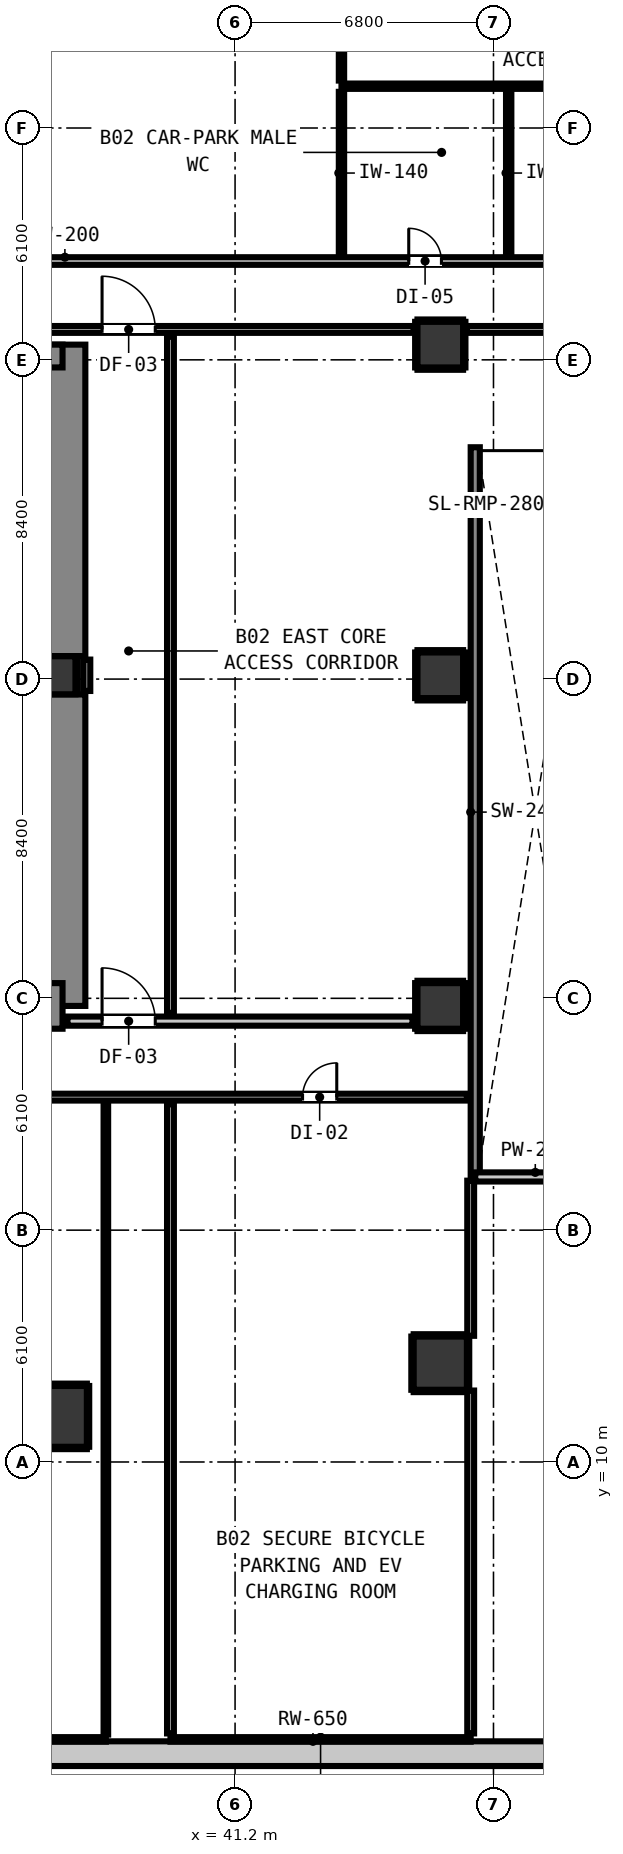
"""IFC4 building model, lengths in metres.
Left out: names, types, materials, properties, quantities, classifications, styles, units other than length and angle.
Written with IfcOpenShell. Run it as: python <this file> out.ifc"""

import sys

from ifc_helpers import new_model, si_unit, direction, frame, frame_2d, origin, origin_2d, place, context, subcontext, project, spatial, rectangle, circle, extrude, element, fill, save


model = new_model("IFC4")
c1 = context("Model", 3, precision=1e-05, world=origin(), true_north=direction((0.0, 1.0)))
c2 = subcontext(c1, "Body", "Model", "MODEL_VIEW")
j1 = project(units=[si_unit("LENGTHUNIT", "METRE"), si_unit("PLANEANGLEUNIT", "RADIAN")], contexts=[c1])
p1 = place(None, origin())
s1 = spatial("IfcSite", under=j1, at=p1, CompositionType="ELEMENT")
p2 = place(p1, origin())
s2 = spatial("IfcBuilding", under=s1, at=p2, CompositionType="ELEMENT")
p3 = place(p2, frame((0.0, 0.0, -8.8)))
s3 = spatial("IfcBuildingStorey", under=s2, at=p3, CompositionType="ELEMENT", Elevation=-8.8)
p4 = place(p3, frame((1.5, 2.325, 0.0), z_axis=(0.0, 0.0, 1.0), x_axis=(1.0, 0.0, 0.0)))
e1 = element("IfcWall", 1, at=p4, inside=s3, PredefinedType="SOLIDWALL", context=c2, shape_type="SweptSolid", body=[
    extrude(rectangle(XDim=83.5, YDim=0.65, at=frame_2d((41.75, 0.0))), origin(), (0.0, 0.0, 1.0), 4.4),
])
p5 = place(p3, frame((36.5, 30.7, 0.0), z_axis=(0.0, 0.0, 1.0), x_axis=(1.0, 0.0, 0.0)))
e2 = element("IfcColumn", 2, at=p5, inside=s3, PredefinedType="COLUMN", context=c2, shape_type="SweptSolid", body=[
    extrude(rectangle(XDim=1.0, YDim=1.0, at=origin_2d()), origin(), (0.0, 0.0, 1.0), 4.4),
])
p6 = place(p3, frame((36.66, 22.0, 0.0), z_axis=(0.0, 0.0, 1.0), x_axis=(0.0, 1.0, 0.0)))
e3 = element("IfcWall", 3, at=p6, inside=s3, PredefinedType="SHEAR", context=c2, shape_type="SweptSolid", body=[
    extrude(rectangle(XDim=8.195, YDim=1.2, at=frame_2d((4.098, 0.0))), origin(), (0.0, 0.0, 1.0), 4.4),
])
p7 = place(p3, frame((36.66, 31.205, 0.0), z_axis=(0.0, 0.0, 1.0), x_axis=(0.0, 1.0, 0.0)))
e4 = element("IfcWall", 4, at=p7, inside=s3, PredefinedType="SHEAR", context=c2, shape_type="SweptSolid", body=[
    extrude(rectangle(XDim=8.195, YDim=1.2, at=frame_2d((4.097, 0.0))), origin(), (0.0, 0.0, 1.0), 4.4),
])
p8 = place(p3, frame((29.705, 22.0, 0.0), z_axis=(0.0, 0.0, 1.0), x_axis=(1.0, 0.0, 0.0)))
e5 = element("IfcWall", 5, at=p8, inside=s3, PredefinedType="SHEAR", context=c2, shape_type="SweptSolid", body=[
    extrude(rectangle(XDim=6.955, YDim=1.2, at=frame_2d((3.478, 0.0))), origin(), (0.0, 0.0, 1.0), 4.4),
])
p9 = place(p3, frame((32.58, 39.1, 0.0), z_axis=(0.0, 0.0, 1.0), x_axis=(1.0, 0.0, 0.0)))
e6 = element("IfcWall", 6, at=p9, inside=s3, PredefinedType="SHEAR", context=c2, shape_type="SweptSolid", body=[
    extrude(rectangle(XDim=4.08, YDim=0.6, at=frame_2d((2.04, 0.0))), origin(), (0.0, 0.0, 1.0), 4.4),
])
p10 = place(p3, frame((47.52, 17.5, 0.0), z_axis=(0.0, 0.0, 1.0), x_axis=(0.0, 1.0, 0.0)))
e7 = element("IfcWall", 7, at=p10, inside=s3, PredefinedType="SHEAR", context=c2, shape_type="SweptSolid", body=[
    extrude(rectangle(XDim=19.2, YDim=0.24, at=frame_2d((9.6, 0.0))), origin(), (0.0, 0.0, 1.0), 4.4),
])
p11 = place(p3, frame((36.5, 11.2, 0.0), z_axis=(0.0, 0.0, 1.0), x_axis=(1.0, 0.0, 0.0)))
e8 = element("IfcColumn", 8, at=p11, inside=s3, PredefinedType="COLUMN", context=c2, shape_type="SweptSolid", body=[
    extrude(rectangle(XDim=1.6, YDim=1.6, at=origin_2d()), origin(), (0.0, 0.0, 1.0), 4.4),
])
for number, where, z_axis, x_axis in (
    (9, (46.6, 22.0, 0.0), (0.0, 0.0, 1.0), (1.0, 0.0, 0.0)),
    (10, (46.6, 30.7, 0.0), (0.0, 0.0, 1.0), (1.0, 0.0, 0.0)),
    (11, (46.6, 39.4, 0.0), (0.0, 0.0, 1.0), (1.0, 0.0, 0.0)),
):
    element("IfcColumn", number, at=place(p3, frame(where, z_axis=z_axis, x_axis=x_axis)), inside=s3, PredefinedType="COLUMN", context=c2, shape_type="SweptSolid", body=[
        extrude(circle(Radius=0.6, at=origin_2d()), origin(), (0.0, 0.0, 1.0), 4.4),
    ])
p12 = place(p3, frame((46.6, 12.6, 0.0), z_axis=(0.0, 0.0, 1.0), x_axis=(1.0, 0.0, 0.0)))
e12 = element("IfcColumn", 12, at=p12, inside=s3, PredefinedType="COLUMN", context=c2, shape_type="SweptSolid", body=[
    extrude(rectangle(XDim=1.4, YDim=1.4, at=origin_2d()), origin(), (0.0, 0.0, 1.0), 4.4),
])
p13 = place(p3, frame((47.52, 17.5, 0.0), z_axis=(0.0, 0.0, 1.0), x_axis=(1.0, 0.0, 0.0)))
e13 = element("IfcWall", 13, at=p13, inside=s3, PredefinedType="PARAPET", context=c2, shape_type="SweptSolid", body=[
    extrude(rectangle(XDim=3.16, YDim=0.24, at=frame_2d((1.58, 0.0))), origin(), (0.0, 0.0, 1.0), 1.2),
])
p14 = place(p3, frame((36.79, 21.6, 0.0), z_axis=(0.0, 0.0, 1.0), x_axis=(1.0, 0.0, 0.0)))
e14 = element("IfcWall", 14, at=p14, inside=s3, PredefinedType="PARTITIONING", context=c2, shape_type="SweptSolid", body=[
    extrude(rectangle(XDim=9.078, YDim=0.24, at=frame_2d((4.539, 0.0))), origin(), (0.0, 0.0, 1.0), 3.335),
])
p15 = place(p14, frame((0.91, 0.0, 0.0)))
e15 = element("IfcOpeningElement", 15, at=p15, cuts=e14, PredefinedType="OPENING", context=c2, shape_type="SweptSolid", body=[
    extrude(rectangle(XDim=1.4, YDim=2.15, at=frame_2d((0.7, 1.075))), frame((0.0, 0.13, 0.0), z_axis=(0.0, -1.0, 0.0), x_axis=(1.0, 0.0, 0.0)), (0.0, 0.0, 1.0), 0.26),
])
p16 = place(p3, frame((10.4, 41.6, 0.0), z_axis=(0.0, 0.0, 1.0), x_axis=(1.0, 0.0, 0.0)))
e16 = element("IfcWall", 16, at=p16, inside=s3, PredefinedType="PARTITIONING", context=c2, shape_type="SweptSolid", body=[
    extrude(rectangle(XDim=44.788, YDim=0.2, at=frame_2d((22.394, 0.0))), origin(), (0.0, 0.0, 1.0), 4.1),
])
p17 = place(p16, frame((16.374, 0.0, 0.0)))
e17 = element("IfcOpeningElement", 17, at=p17, cuts=e16, PredefinedType="OPENING", context=c2, shape_type="SweptSolid", body=[
    extrude(rectangle(XDim=0.9, YDim=2.1, at=frame_2d((0.45, 1.05))), frame((0.0, 0.11, 0.0), z_axis=(0.0, -1.0, 0.0), x_axis=(1.0, 0.0, 0.0)), (0.0, 0.0, 1.0), 0.22),
])
p18 = place(p16, frame((35.37, 0.0, 0.0)))
e18 = element("IfcOpeningElement", 18, at=p18, cuts=e16, PredefinedType="OPENING", context=c2, shape_type="SweptSolid", body=[
    extrude(rectangle(XDim=0.86, YDim=2.02, at=frame_2d((0.43, 1.01))), frame((0.0, 0.11, 0.0), z_axis=(0.0, -1.0, 0.0), x_axis=(1.0, 0.0, 0.0)), (0.0, 0.0, 1.0), 0.22),
])
p19 = place(p16, frame((39.725, 0.0, 0.0)))
e19 = element("IfcOpeningElement", 19, at=p19, cuts=e16, PredefinedType="OPENING", context=c2, shape_type="SweptSolid", body=[
    extrude(rectangle(XDim=0.95, YDim=2.1, at=frame_2d((0.475, 1.05))), frame((0.0, 0.11, 0.0), z_axis=(0.0, -1.0, 0.0), x_axis=(1.0, 0.0, 0.0)), (0.0, 0.0, 1.0), 0.22),
])
p20 = place(p3, frame((10.4, 19.6, 0.0), z_axis=(0.0, 0.0, 1.0), x_axis=(1.0, 0.0, 0.0)))
e20 = element("IfcWall", 20, at=p20, inside=s3, PredefinedType="PARTITIONING", context=c2, shape_type="SweptSolid", body=[
    extrude(rectangle(XDim=36.902, YDim=0.18, at=frame_2d((18.451, 0.0))), origin(), (0.0, 0.0, 1.0), 4.1),
])
p21 = place(p20, frame((13.274, 0.0, 0.0)))
e21 = element("IfcOpeningElement", 21, at=p21, cuts=e20, PredefinedType="OPENING", context=c2, shape_type="SweptSolid", body=[
    extrude(rectangle(XDim=0.9, YDim=2.1, at=frame_2d((0.45, 1.05))), frame((0.0, 0.1, 0.0), z_axis=(0.0, -1.0, 0.0), x_axis=(1.0, 0.0, 0.0)), (0.0, 0.0, 1.0), 0.2),
])
p22 = place(p20, frame((32.576, 0.0, 0.0)))
e22 = element("IfcOpeningElement", 22, at=p22, cuts=e20, PredefinedType="OPENING", context=c2, shape_type="SweptSolid", body=[
    extrude(rectangle(XDim=0.9, YDim=2.1, at=frame_2d((0.45, 1.05))), frame((0.0, 0.1, 0.0), z_axis=(0.0, -1.0, 0.0), x_axis=(1.0, 0.0, 0.0)), (0.0, 0.0, 1.0), 0.2),
])
p23 = place(p3, frame((29.802, 39.8, 0.0), z_axis=(0.0, 0.0, 1.0), x_axis=(1.0, 0.0, 0.0)))
e23 = element("IfcWall", 23, at=p23, inside=s3, PredefinedType="PARTITIONING", context=c2, shape_type="SweptSolid", body=[
    extrude(rectangle(XDim=16.096, YDim=0.18, at=frame_2d((8.048, 0.0))), origin(), (0.0, 0.0, 1.0), 3.335),
])
p24 = place(p23, frame((7.898, 0.0, 0.0)))
e24 = element("IfcOpeningElement", 24, at=p24, cuts=e23, PredefinedType="OPENING", context=c2, shape_type="SweptSolid", body=[
    extrude(rectangle(XDim=1.4, YDim=2.15, at=frame_2d((0.7, 1.075))), frame((0.0, 0.1, 0.0), z_axis=(0.0, -1.0, 0.0), x_axis=(1.0, 0.0, 0.0)), (0.0, 0.0, 1.0), 0.2),
])
p25 = place(p3, frame((47.302, 39.8, 0.0), z_axis=(0.0, 0.0, 1.0), x_axis=(1.0, 0.0, 0.0)))
e25 = element("IfcWall", 25, at=p25, inside=s3, PredefinedType="PARTITIONING", context=c2, shape_type="SweptSolid", body=[
    extrude(rectangle(XDim=23.098, YDim=0.18, at=frame_2d((11.549, 0.0))), origin(), (0.0, 0.0, 1.0), 4.1),
])
p26 = place(p3, frame((44.0, 46.2, 0.0), z_axis=(0.0, 0.0, 1.0), x_axis=(1.0, 0.0, 0.0)))
e26 = element("IfcWall", 26, at=p26, inside=s3, PredefinedType="PARTITIONING", context=c2, shape_type="SweptSolid", body=[
    extrude(rectangle(XDim=8.8, YDim=0.14, at=frame_2d((4.4, 0.0))), origin(), (0.0, 0.0, 1.0), 4.1),
])
p27 = place(p3, frame((2.2, 2.7, 0.0), z_axis=(0.0, 0.0, 1.0), x_axis=(1.0, 0.0, 0.0)))
e27 = element("IfcWall", 27, at=p27, inside=s3, PredefinedType="PARTITIONING", context=c2, shape_type="SweptSolid", body=[
    extrude(rectangle(XDim=35.6, YDim=0.12, at=frame_2d((17.8, 0.0))), origin(), (0.0, 0.0, 1.0), 4.1),
])
p28 = place(p3, frame((39.5, 2.7, 0.0), z_axis=(0.0, 0.0, 1.0), x_axis=(1.0, 0.0, 0.0)))
e28 = element("IfcWall", 28, at=p28, inside=s3, PredefinedType="PARTITIONING", context=c2, shape_type="SweptSolid", body=[
    extrude(rectangle(XDim=7.9, YDim=0.12, at=frame_2d((3.95, 0.0))), origin(), (0.0, 0.0, 1.0), 4.1),
])
p29 = place(p3, frame((37.3, 30.287, 0.0), z_axis=(0.0, 0.0, 1.0), x_axis=(0.0, 1.0, 0.0)))
e29 = element("IfcWall", 29, at=p29, inside=s3, PredefinedType="PARTITIONING", context=c2, shape_type="SweptSolid", body=[
    extrude(rectangle(XDim=0.826, YDim=0.18, at=frame_2d((0.413, 0.0))), origin(), (0.0, 0.0, 1.0), 4.1),
])
p30 = place(p3, frame((39.5, 2.858, 0.0), z_axis=(0.0, 0.0, 1.0), x_axis=(0.0, 1.0, 0.0)))
e30 = element("IfcWall", 30, at=p30, inside=s3, PredefinedType="PARTITIONING", context=c2, shape_type="SweptSolid", body=[
    extrude(rectangle(XDim=16.554, YDim=0.18, at=frame_2d((8.277, 0.0))), origin(), (0.0, 0.0, 1.0), 4.1),
])
p31 = place(p3, frame((39.5, 21.818, 0.0), z_axis=(0.0, 0.0, 1.0), x_axis=(0.0, 1.0, 0.0)))
e31 = element("IfcWall", 31, at=p31, inside=s3, PredefinedType="PARTITIONING", context=c2, shape_type="SweptSolid", body=[
    extrude(rectangle(XDim=17.794, YDim=0.18, at=frame_2d((8.897, 0.0))), origin(), (0.0, 0.0, 1.0), 4.1),
])
p32 = place(p3, frame((47.4, 2.858, 0.0), z_axis=(0.0, 0.0, 1.0), x_axis=(0.0, 1.0, 0.0)))
e32 = element("IfcWall", 32, at=p32, inside=s3, PredefinedType="PARTITIONING", context=c2, shape_type="SweptSolid", body=[
    extrude(rectangle(XDim=9.022, YDim=0.18, at=frame_2d((4.511, 0.0))), origin(), (0.0, 0.0, 1.0), 4.1),
])
p33 = place(p3, frame((47.4, 13.32, 0.0), z_axis=(0.0, 0.0, 1.0), x_axis=(0.0, 1.0, 0.0)))
e33 = element("IfcWall", 33, at=p33, inside=s3, PredefinedType="PARTITIONING", context=c2, shape_type="SweptSolid", body=[
    extrude(rectangle(XDim=4.082, YDim=0.18, at=frame_2d((2.041, 0.0))), origin(), (0.0, 0.0, 1.0), 4.1),
])
p34 = place(p3, frame((44.0, 41.778, 0.0), z_axis=(0.0, 0.0, 1.0), x_axis=(0.0, 1.0, 0.0)))
e34 = element("IfcWall", 34, at=p34, inside=s3, PredefinedType="PARTITIONING", context=c2, shape_type="SweptSolid", body=[
    extrude(rectangle(XDim=4.274, YDim=0.14, at=frame_2d((2.137, 0.0))), origin(), (0.0, 0.0, 1.0), 4.1),
])
p35 = place(p3, frame((44.0, 46.348, 0.0), z_axis=(0.0, 0.0, 1.0), x_axis=(0.0, 1.0, 0.0)))
e35 = element("IfcWall", 35, at=p35, inside=s3, PredefinedType="PARTITIONING", context=c2, shape_type="SweptSolid", body=[
    extrude(rectangle(XDim=11.314, YDim=0.14, at=frame_2d((5.657, 0.0))), origin(), (0.0, 0.0, 1.0), 4.1),
])
p36 = place(p3, frame((48.4, 41.778, 0.0), z_axis=(0.0, 0.0, 1.0), x_axis=(0.0, 1.0, 0.0)))
e36 = element("IfcWall", 36, at=p36, inside=s3, PredefinedType="PARTITIONING", context=c2, shape_type="SweptSolid", body=[
    extrude(rectangle(XDim=4.274, YDim=0.14, at=frame_2d((2.137, 0.0))), origin(), (0.0, 0.0, 1.0), 4.1),
])
p37 = place(p3, frame((37.8, 2.828, 0.0), z_axis=(0.0, 0.0, 1.0), x_axis=(0.0, 1.0, 0.0)))
e37 = element("IfcWall", 37, at=p37, inside=s3, PredefinedType="PARTITIONING", context=c2, shape_type="SweptSolid", body=[
    extrude(rectangle(XDim=16.614, YDim=0.12, at=frame_2d((8.307, 0.0))), origin(), (0.0, 0.0, 1.0), 4.1),
])
p38 = place(p3, frame((37.032, 30.21, 0.0), z_axis=(0.0, 0.0, 1.0), x_axis=(0.0, 1.0, 0.0)))
e38 = element("IfcWall", 38, at=p38, inside=s3, PredefinedType="PARTITIONING", context=c2, shape_type="SweptSolid", body=[
    extrude(rectangle(XDim=0.98, YDim=0.06, at=frame_2d((0.49, 0.0))), origin(), (0.0, 0.0, 1.0), 1.45),
])
for number, where, z_axis, x_axis in (
    (39, (35.7, 10.368, 0.0), (0.0, 0.0, 1.0), (1.0, 0.0, 0.0)),
    (40, (35.7, 12.032, 0.0), (0.0, 0.0, 1.0), (1.0, 0.0, 0.0)),
    (41, (37.332, 10.4, 0.0), (0.0, 0.0, 1.0), (0.0, 1.0, 0.0)),
):
    element("IfcWall", number, at=place(p3, frame(where, z_axis=z_axis, x_axis=x_axis)), inside=s3, PredefinedType="PARTITIONING", context=c2, shape_type="SweptSolid", body=[
        extrude(rectangle(XDim=1.6, YDim=0.06, at=frame_2d((0.8, 0.0))), origin(), (0.0, 0.0, 1.0), 1.45),
    ])
for number, where, z_axis, x_axis in (
    (42, (46.0, 21.368, 0.0), (0.0, 0.0, 1.0), (1.0, 0.0, 0.0)),
    (43, (46.0, 22.632, 0.0), (0.0, 0.0, 1.0), (1.0, 0.0, 0.0)),
):
    element("IfcWall", number, at=place(p3, frame(where, z_axis=z_axis, x_axis=x_axis)), inside=s3, PredefinedType="PARTITIONING", context=c2, shape_type="SweptSolid", body=[
        extrude(rectangle(XDim=1.2, YDim=0.06, at=frame_2d((0.6, 0.0))), origin(), (0.0, 0.0, 1.0), 1.45),
    ])
for number, where, z_axis, x_axis in (
    (44, (45.968, 21.4, 0.0), (0.0, 0.0, 1.0), (0.0, 1.0, 0.0)),
    (45, (47.232, 21.4, 0.0), (0.0, 0.0, 1.0), (0.0, 1.0, 0.0)),
):
    element("IfcWall", number, at=place(p3, frame(where, z_axis=z_axis, x_axis=x_axis)), inside=s3, PredefinedType="PARTITIONING", context=c2, shape_type="SweptSolid", body=[
        extrude(rectangle(XDim=1.2, YDim=0.06, at=frame_2d((0.6, 0.0))), origin(), (0.0, 0.0, 1.0), 1.45),
    ])
for number, where, z_axis, x_axis in (
    (46, (46.0, 30.068, 0.0), (0.0, 0.0, 1.0), (1.0, 0.0, 0.0)),
    (47, (46.0, 31.332, 0.0), (0.0, 0.0, 1.0), (1.0, 0.0, 0.0)),
    (48, (45.968, 30.1, 0.0), (0.0, 0.0, 1.0), (0.0, 1.0, 0.0)),
    (49, (47.232, 30.1, 0.0), (0.0, 0.0, 1.0), (0.0, 1.0, 0.0)),
    (50, (46.0, 38.768, 0.0), (0.0, 0.0, 1.0), (1.0, 0.0, 0.0)),
    (51, (46.0, 40.032, 0.0), (0.0, 0.0, 1.0), (1.0, 0.0, 0.0)),
    (52, (45.968, 38.8, 0.0), (0.0, 0.0, 1.0), (0.0, 1.0, 0.0)),
    (53, (47.232, 38.8, 0.0), (0.0, 0.0, 1.0), (0.0, 1.0, 0.0)),
):
    element("IfcWall", number, at=place(p3, frame(where, z_axis=z_axis, x_axis=x_axis)), inside=s3, PredefinedType="PARTITIONING", context=c2, shape_type="SweptSolid", body=[
        extrude(rectangle(XDim=1.2, YDim=0.06, at=frame_2d((0.6, 0.0))), origin(), (0.0, 0.0, 1.0), 1.45),
    ])
for number, where, z_axis, x_axis in (
    (54, (45.9, 11.868, 0.0), (0.0, 0.0, 1.0), (1.0, 0.0, 0.0)),
    (55, (45.9, 13.332, 0.0), (0.0, 0.0, 1.0), (1.0, 0.0, 0.0)),
    (56, (45.868, 11.9, 0.0), (0.0, 0.0, 1.0), (0.0, 1.0, 0.0)),
    (57, (47.332, 11.9, 0.0), (0.0, 0.0, 1.0), (0.0, 1.0, 0.0)),
):
    element("IfcWall", number, at=place(p3, frame(where, z_axis=z_axis, x_axis=x_axis)), inside=s3, PredefinedType="PARTITIONING", context=c2, shape_type="SweptSolid", body=[
        extrude(rectangle(XDim=1.4, YDim=0.06, at=frame_2d((0.7, 0.0))), origin(), (0.0, 0.0, 1.0), 1.45),
    ])
p39 = place(p15, origin())
e58 = element("IfcDoor", 58, at=p39, inside=s3, OperationType="SINGLE_SWING_LEFT", PredefinedType="DOOR", context=c2, shape_type="SweptSolid", body=[
    extrude(rectangle(XDim=1.4, YDim=2.15, at=frame_2d((0.7, 1.075))), frame((0.0, 0.025, 0.0), z_axis=(0.0, -1.0, 0.0), x_axis=(1.0, 0.0, 0.0)), (0.0, 0.0, 1.0), 0.05),
])
fill(e15, e58)
p40 = place(p24, origin())
e59 = element("IfcDoor", 59, at=p40, inside=s3, OperationType="SINGLE_SWING_LEFT", PredefinedType="DOOR", context=c2, shape_type="SweptSolid", body=[
    extrude(rectangle(XDim=1.4, YDim=2.15, at=frame_2d((0.7, 1.075))), frame((0.0, 0.025, 0.0), z_axis=(0.0, -1.0, 0.0), x_axis=(1.0, 0.0, 0.0)), (0.0, 0.0, 1.0), 0.05),
])
fill(e24, e59)
p41 = place(p22, origin())
e60 = element("IfcDoor", 60, at=p41, inside=s3, OperationType="SINGLE_SWING_RIGHT", PredefinedType="DOOR", context=c2, shape_type="SweptSolid", body=[
    extrude(rectangle(XDim=0.9, YDim=2.1, at=frame_2d((0.45, 1.05))), frame((0.0, 0.025, 0.0), z_axis=(0.0, -1.0, 0.0), x_axis=(1.0, 0.0, 0.0)), (0.0, 0.0, 1.0), 0.05),
])
fill(e22, e60)
p42 = place(p18, origin())
e61 = element("IfcDoor", 61, at=p42, inside=s3, OperationType="SINGLE_SWING_LEFT", PredefinedType="DOOR", context=c2, shape_type="SweptSolid", body=[
    extrude(rectangle(XDim=0.86, YDim=2.02, at=frame_2d((0.43, 1.01))), frame((0.0, 0.025, 0.0), z_axis=(0.0, -1.0, 0.0), x_axis=(1.0, 0.0, 0.0)), (0.0, 0.0, 1.0), 0.05),
])
fill(e18, e61)
save(model, sys.argv[1])
